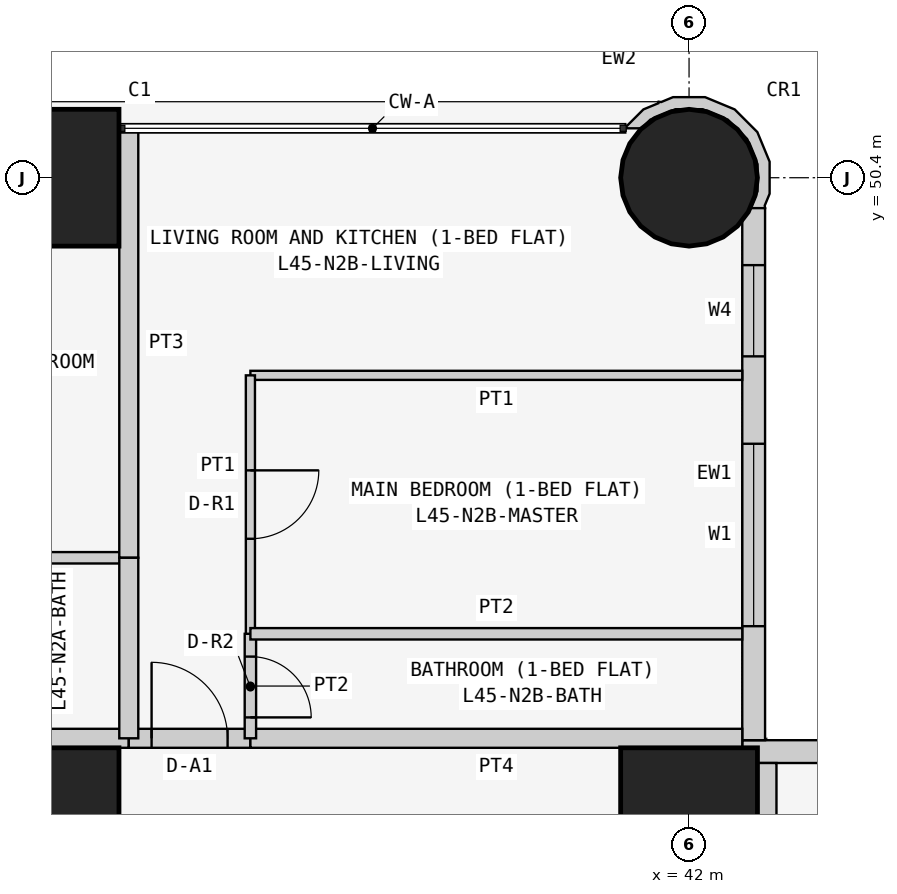
"""IFC4 building model, lengths in metres.
Left out: names, types, materials, properties, quantities, classifications, styles, units other than length and angle.
Written with IfcOpenShell. Run it as: python <this file> out.ifc"""

import sys

from ifc_helpers import new_model, si_unit, direction, frame, frame_2d, origin, origin_2d, place, context, subcontext, project, spatial, polyline, rectangle, circle, outline, extrude, element, fill, save


model = new_model("IFC4")
c1 = context("Model", 3, precision=1e-05, world=origin(), true_north=direction((0.0, 1.0)))
c2 = subcontext(c1, "Body", "Model", "MODEL_VIEW")
j1 = project(units=[si_unit("LENGTHUNIT", "METRE"), si_unit("PLANEANGLEUNIT", "RADIAN")], contexts=[c1])
p1 = place(None, origin())
s1 = spatial("IfcSite", under=j1, at=p1, CompositionType="ELEMENT")
p2 = place(p1, origin())
s2 = spatial("IfcBuilding", under=s1, at=p2, CompositionType="ELEMENT")
p3 = place(p2, frame((0.0, 0.0, 173.7)))
s3 = spatial("IfcBuildingStorey", under=s2, at=p3, CompositionType="ELEMENT", Elevation=173.7)
for number, where, z_axis, x_axis in (
    (1, (33.6, 42.0, 0.0), (0.0, 0.0, 1.0), (1.0, 0.0, 0.0)),
    (2, (33.6, 50.4, 0.0), (0.0, 0.0, 1.0), (1.0, 0.0, 0.0)),
    (3, (42.0, 42.0, 0.0), (0.0, 0.0, 1.0), (1.0, 0.0, 0.0)),
):
    element("IfcColumn", number, at=place(p3, frame(where, z_axis=z_axis, x_axis=x_axis)), inside=s3, PredefinedType="COLUMN", context=c2, shape_type="SweptSolid", body=[
        extrude(rectangle(XDim=1.8, YDim=1.8, at=origin_2d()), origin(), (0.0, 0.0, 1.0), 3.6),
    ])
p4 = place(p3, frame((42.0, 50.4, 0.0), z_axis=(0.0, 0.0, 1.0), x_axis=(1.0, 0.0, 0.0)))
e4 = element("IfcColumn", 4, at=p4, inside=s3, PredefinedType="COLUMN", context=c2, shape_type="SweptSolid", body=[
    extrude(circle(Radius=0.9, at=origin_2d()), origin(), (0.0, 0.0, 1.0), 3.6),
])
p5 = place(p3, frame((58.4, 42.85, 0.0), z_axis=(0.0, 0.0, 1.0), x_axis=(-1.0, 0.0, 0.0)))
e5 = element("IfcWall", 5, at=p5, inside=s3, PredefinedType="SOLIDWALL", context=c2, shape_type="SweptSolid", body=[
    extrude(rectangle(XDim=15.7, YDim=0.3, at=frame_2d((7.85, 0.0))), origin(), (0.0, 0.0, 1.0), 3.35),
])
p6 = place(p5, frame((12.4, 0.0, 0.9)))
e6 = element("IfcOpeningElement", 6, at=p6, cuts=e5, PredefinedType="OPENING", context=c2, shape_type="SweptSolid", body=[
    extrude(rectangle(XDim=1.8, YDim=1.5, at=frame_2d((0.9, 0.75))), frame((0.0, 0.16, 0.0), z_axis=(0.0, -1.0, 0.0), x_axis=(1.0, 0.0, 0.0)), (0.0, 0.0, 1.0), 0.32),
])
p7 = place(p5, frame((9.55, 0.0, 1.5)))
e7 = element("IfcOpeningElement", 7, at=p7, cuts=e5, PredefinedType="OPENING", context=c2, shape_type="SweptSolid", body=[
    extrude(rectangle(XDim=0.9, YDim=0.7, at=frame_2d((0.45, 0.35))), frame((0.0, 0.16, 0.0), z_axis=(0.0, -1.0, 0.0), x_axis=(1.0, 0.0, 0.0)), (0.0, 0.0, 1.0), 0.32),
])
p8 = place(p5, frame((5.1, 0.0, 0.9)))
e8 = element("IfcOpeningElement", 8, at=p8, cuts=e5, PredefinedType="OPENING", context=c2, shape_type="SweptSolid", body=[
    extrude(rectangle(XDim=1.8, YDim=1.5, at=frame_2d((0.9, 0.75))), frame((0.0, 0.16, 0.0), z_axis=(0.0, -1.0, 0.0), x_axis=(1.0, 0.0, 0.0)), (0.0, 0.0, 1.0), 0.32),
])
p9 = place(p5, frame((2.0, 0.0, 0.0)))
e9 = element("IfcOpeningElement", 9, at=p9, cuts=e5, PredefinedType="OPENING", context=c2, shape_type="SweptSolid", body=[
    extrude(rectangle(XDim=0.9, YDim=2.4, at=frame_2d((0.45, 1.2))), frame((0.0, 0.16, 0.0), z_axis=(0.0, -1.0, 0.0), x_axis=(1.0, 0.0, 0.0)), (0.0, 0.0, 1.0), 0.32),
])
p10 = place(p5, frame((0.7, 0.0, 0.9)))
e10 = element("IfcOpeningElement", 10, at=p10, cuts=e5, PredefinedType="OPENING", context=c2, shape_type="SweptSolid", body=[
    extrude(rectangle(XDim=1.2, YDim=1.5, at=frame_2d((0.6, 0.75))), frame((0.0, 0.16, 0.0), z_axis=(0.0, -1.0, 0.0), x_axis=(1.0, 0.0, 0.0)), (0.0, 0.0, 1.0), 0.32),
])
p11 = place(p3, frame((42.85, 43.0, 0.0), z_axis=(0.0, 0.0, 1.0), x_axis=(0.0, 1.0, 0.0)))
e11 = element("IfcWall", 11, at=p11, inside=s3, PredefinedType="SOLIDWALL", context=c2, shape_type="SweptSolid", body=[
    extrude(rectangle(XDim=7.0, YDim=0.3, at=frame_2d((3.5, 0.0))), origin(), (0.0, 0.0, 1.0), 3.35),
])
p12 = place(p11, frame((1.5, 0.0, 0.9)))
e12 = element("IfcOpeningElement", 12, at=p12, cuts=e11, PredefinedType="OPENING", context=c2, shape_type="SweptSolid", body=[
    extrude(rectangle(XDim=2.4, YDim=1.5, at=frame_2d((1.2, 0.75))), frame((0.0, 0.16, 0.0), z_axis=(0.0, -1.0, 0.0), x_axis=(1.0, 0.0, 0.0)), (0.0, 0.0, 1.0), 0.32),
])
p13 = place(p11, frame((5.05, 0.0, 0.9)))
e13 = element("IfcOpeningElement", 13, at=p13, cuts=e11, PredefinedType="OPENING", context=c2, shape_type="SweptSolid", body=[
    extrude(rectangle(XDim=1.2, YDim=1.5, at=frame_2d((0.6, 0.75))), frame((0.0, 0.16, 0.0), z_axis=(0.0, -1.0, 0.0), x_axis=(1.0, 0.0, 0.0)), (0.0, 0.0, 1.0), 0.32),
])
p14 = place(p3, frame((42.91, 50.036, 0.0), z_axis=(0.0, 0.0, 1.0), x_axis=(0.377204953059, 0.926129809145, 0.0)))
e14 = element("IfcWall", 14, at=p14, inside=s3, PredefinedType="SOLIDWALL", context=c2, shape_type="SweptSolid", body=[
    extrude(outline(polyline([(0.769, 1.728), (0.75, 1.723), (0.6, 1.875), (0.295, 2.004), (0.281, 1.998), (0.36, 1.803), (0.509, 1.741), (0.761, 1.486), (0.896, 1.154), (0.894, 0.795), (0.755, 0.465), (0.5, 0.213), (0.168, 0.078), (-0.1, 0.079), (0.001, -0.097), (0.03, -0.08), (0.198, -0.081), (0.589, 0.078), (0.889, 0.374), (1.053, 0.763), (1.055, 1.185), (0.896, 1.575), (0.778, 1.695), (0.769, 1.728)])), origin(), (0.0, 0.0, 1.0), 3.35),
])
p15 = place(p3, frame((32.0, 43.025, 0.0), z_axis=(0.0, 0.0, 1.0), x_axis=(1.0, 0.0, 0.0)))
e15 = element("IfcWall", 15, at=p15, inside=s3, PredefinedType="PARTITIONING", context=c2, shape_type="SweptSolid", body=[
    extrude(rectangle(XDim=2.629, YDim=0.25, at=frame_2d((1.314, 0.0))), origin(), (0.0, 0.0, 1.0), 3.35),
])
p16 = place(p3, frame((34.629, 43.025, 0.0), z_axis=(0.0, 0.0, 1.0), x_axis=(1.0, 0.0, 0.0)))
e16 = element("IfcWall", 16, at=p16, inside=s3, PredefinedType="PARTITIONING", context=c2, shape_type="SweptSolid", body=[
    extrude(rectangle(XDim=1.6, YDim=0.25, at=frame_2d((0.8, 0.0))), origin(), (0.0, 0.0, 1.0), 3.35),
])
p17 = place(p16, frame((0.3, 0.0, 0.0)))
e17 = element("IfcOpeningElement", 17, at=p17, cuts=e16, PredefinedType="OPENING", context=c2, shape_type="SweptSolid", body=[
    extrude(rectangle(XDim=1.0, YDim=2.1, at=frame_2d((0.5, 1.05))), frame((0.0, 0.135, 0.0), z_axis=(0.0, -1.0, 0.0), x_axis=(1.0, 0.0, 0.0)), (0.0, 0.0, 1.0), 0.27),
])
p18 = place(p3, frame((36.229, 43.025, 0.0), z_axis=(0.0, 0.0, 1.0), x_axis=(1.0, 0.0, 0.0)))
e18 = element("IfcWall", 18, at=p18, inside=s3, PredefinedType="PARTITIONING", context=c2, shape_type="SweptSolid", body=[
    extrude(rectangle(XDim=6.471, YDim=0.25, at=frame_2d((3.235, 0.0))), origin(), (0.0, 0.0, 1.0), 3.35),
])
p19 = place(p3, frame((43.025, 42.7, 0.0), z_axis=(0.0, 0.0, 1.0), x_axis=(0.0, -1.0, 0.0)))
e19 = element("IfcWall", 19, at=p19, inside=s3, PredefinedType="PARTITIONING", context=c2, shape_type="SweptSolid", body=[
    extrude(rectangle(XDim=6.871, YDim=0.25, at=frame_2d((3.436, 0.0))), origin(), (0.0, 0.0, 1.0), 3.35),
])
p20 = place(p3, frame((34.629, 45.4, 0.0), z_axis=(0.0, 0.0, 1.0), x_axis=(-1.0, 0.0, 0.0)))
e20 = element("IfcWall", 20, at=p20, inside=s3, PredefinedType="PARTITIONING", context=c2, shape_type="SweptSolid", body=[
    extrude(rectangle(XDim=2.629, YDim=0.15, at=frame_2d((1.314, 0.0))), origin(), (0.0, 0.0, 1.0), 3.35),
])
p21 = place(p3, frame((34.629, 51.05, 0.0), z_axis=(0.0, 0.0, 1.0), x_axis=(0.0, -1.0, 0.0)))
e21 = element("IfcWall", 21, at=p21, inside=s3, PredefinedType="PARTITIONING", context=c2, shape_type="SweptSolid", body=[
    extrude(rectangle(XDim=5.65, YDim=0.25, at=frame_2d((2.825, 0.0))), origin(), (0.0, 0.0, 1.0), 3.35),
])
p22 = place(p3, frame((34.629, 45.4, 0.0), z_axis=(0.0, 0.0, 1.0), x_axis=(0.0, -1.0, 0.0)))
e22 = element("IfcWall", 22, at=p22, inside=s3, PredefinedType="PARTITIONING", context=c2, shape_type="SweptSolid", body=[
    extrude(rectangle(XDim=2.375, YDim=0.25, at=frame_2d((1.188, 0.0))), origin(), (0.0, 0.0, 1.0), 3.35),
])
p23 = place(p3, frame((36.229, 44.4, 0.0), z_axis=(0.0, 0.0, 1.0), x_axis=(0.0, -1.0, 0.0)))
e23 = element("IfcWall", 23, at=p23, inside=s3, PredefinedType="PARTITIONING", context=c2, shape_type="SweptSolid", body=[
    extrude(rectangle(XDim=1.375, YDim=0.15, at=frame_2d((0.688, 0.0))), origin(), (0.0, 0.0, 1.0), 3.35),
])
p24 = place(p23, frame((0.3, 0.0, 0.0)))
e24 = element("IfcOpeningElement", 24, at=p24, cuts=e23, PredefinedType="OPENING", context=c2, shape_type="SweptSolid", body=[
    extrude(rectangle(XDim=0.8, YDim=2.1, at=frame_2d((0.4, 1.05))), frame((0.0, 0.085, 0.0), z_axis=(0.0, -1.0, 0.0), x_axis=(1.0, 0.0, 0.0)), (0.0, 0.0, 1.0), 0.17),
])
p25 = place(p3, frame((42.7, 47.8, 0.0), z_axis=(0.0, 0.0, 1.0), x_axis=(-1.0, 0.0, 0.0)))
e25 = element("IfcWall", 25, at=p25, inside=s3, PredefinedType="PARTITIONING", context=c2, shape_type="SweptSolid", body=[
    extrude(rectangle(XDim=6.471, YDim=0.12, at=frame_2d((3.235, 0.0))), origin(), (0.0, 0.0, 1.0), 3.35),
])
p26 = place(p3, frame((36.229, 47.8, 0.0), z_axis=(0.0, 0.0, 1.0), x_axis=(0.0, -1.0, 0.0)))
e26 = element("IfcWall", 26, at=p26, inside=s3, PredefinedType="PARTITIONING", context=c2, shape_type="SweptSolid", body=[
    extrude(rectangle(XDim=3.4, YDim=0.12, at=frame_2d((1.7, 0.0))), origin(), (0.0, 0.0, 1.0), 3.35),
])
p27 = place(p26, frame((1.25, 0.0, 0.0)))
e27 = element("IfcOpeningElement", 27, at=p27, cuts=e26, PredefinedType="OPENING", context=c2, shape_type="SweptSolid", body=[
    extrude(rectangle(XDim=0.9, YDim=2.1, at=frame_2d((0.45, 1.05))), frame((0.0, 0.07, 0.0), z_axis=(0.0, -1.0, 0.0), x_axis=(1.0, 0.0, 0.0)), (0.0, 0.0, 1.0), 0.14),
])
p28 = place(p3, frame((36.229, 44.4, 0.0), z_axis=(0.0, 0.0, 1.0), x_axis=(1.0, 0.0, 0.0)))
e28 = element("IfcWall", 28, at=p28, inside=s3, PredefinedType="PARTITIONING", context=c2, shape_type="SweptSolid", body=[
    extrude(rectangle(XDim=6.471, YDim=0.15, at=frame_2d((3.235, 0.0))), origin(), (0.0, 0.0, 1.0), 3.35),
])
p29 = place(p12, origin())
e29 = element("IfcWindow", 29, at=p29, inside=s3, PartitioningType="SINGLE_PANEL", PredefinedType="WINDOW", context=c2, shape_type="SweptSolid", body=[
    extrude(rectangle(XDim=2.4, YDim=1.5, at=frame_2d((1.2, 0.75))), frame((0.0, 0.03, 0.0), z_axis=(0.0, -1.0, 0.0), x_axis=(1.0, 0.0, 0.0)), (0.0, 0.0, 1.0), 0.06),
])
fill(e12, e29)
p30 = place(p13, origin())
e30 = element("IfcWindow", 30, at=p30, inside=s3, PartitioningType="SINGLE_PANEL", PredefinedType="WINDOW", context=c2, shape_type="SweptSolid", body=[
    extrude(rectangle(XDim=1.2, YDim=1.5, at=frame_2d((0.6, 0.75))), frame((0.0, 0.03, 0.0), z_axis=(0.0, -1.0, 0.0), x_axis=(1.0, 0.0, 0.0)), (0.0, 0.0, 1.0), 0.06),
])
fill(e13, e30)
p31 = place(p17, origin())
e31 = element("IfcDoor", 31, at=p31, inside=s3, OperationType="SINGLE_SWING_LEFT", PredefinedType="DOOR", context=c2, shape_type="SweptSolid", body=[
    extrude(rectangle(XDim=1.0, YDim=2.1, at=frame_2d((0.5, 1.05))), frame((0.0, 0.025, 0.0), z_axis=(0.0, -1.0, 0.0), x_axis=(1.0, 0.0, 0.0)), (0.0, 0.0, 1.0), 0.05),
])
fill(e17, e31)
p32 = place(p24, origin())
e32 = element("IfcDoor", 32, at=p32, inside=s3, OperationType="SINGLE_SWING_RIGHT", PredefinedType="DOOR", context=c2, shape_type="SweptSolid", body=[
    extrude(rectangle(XDim=0.8, YDim=2.1, at=frame_2d((0.4, 1.05))), frame((0.0, 0.025, 0.0), z_axis=(0.0, -1.0, 0.0), x_axis=(1.0, 0.0, 0.0)), (0.0, 0.0, 1.0), 0.05),
])
fill(e24, e32)
p33 = place(p27, origin())
e33 = element("IfcDoor", 33, at=p33, inside=s3, OperationType="SINGLE_SWING_LEFT", PredefinedType="DOOR", context=c2, shape_type="SweptSolid", body=[
    extrude(rectangle(XDim=0.9, YDim=2.1, at=frame_2d((0.45, 1.05))), frame((0.0, 0.025, 0.0), z_axis=(0.0, -1.0, 0.0), x_axis=(1.0, 0.0, 0.0)), (0.0, 0.0, 1.0), 0.05),
])
fill(e27, e33)
save(model, sys.argv[1])
